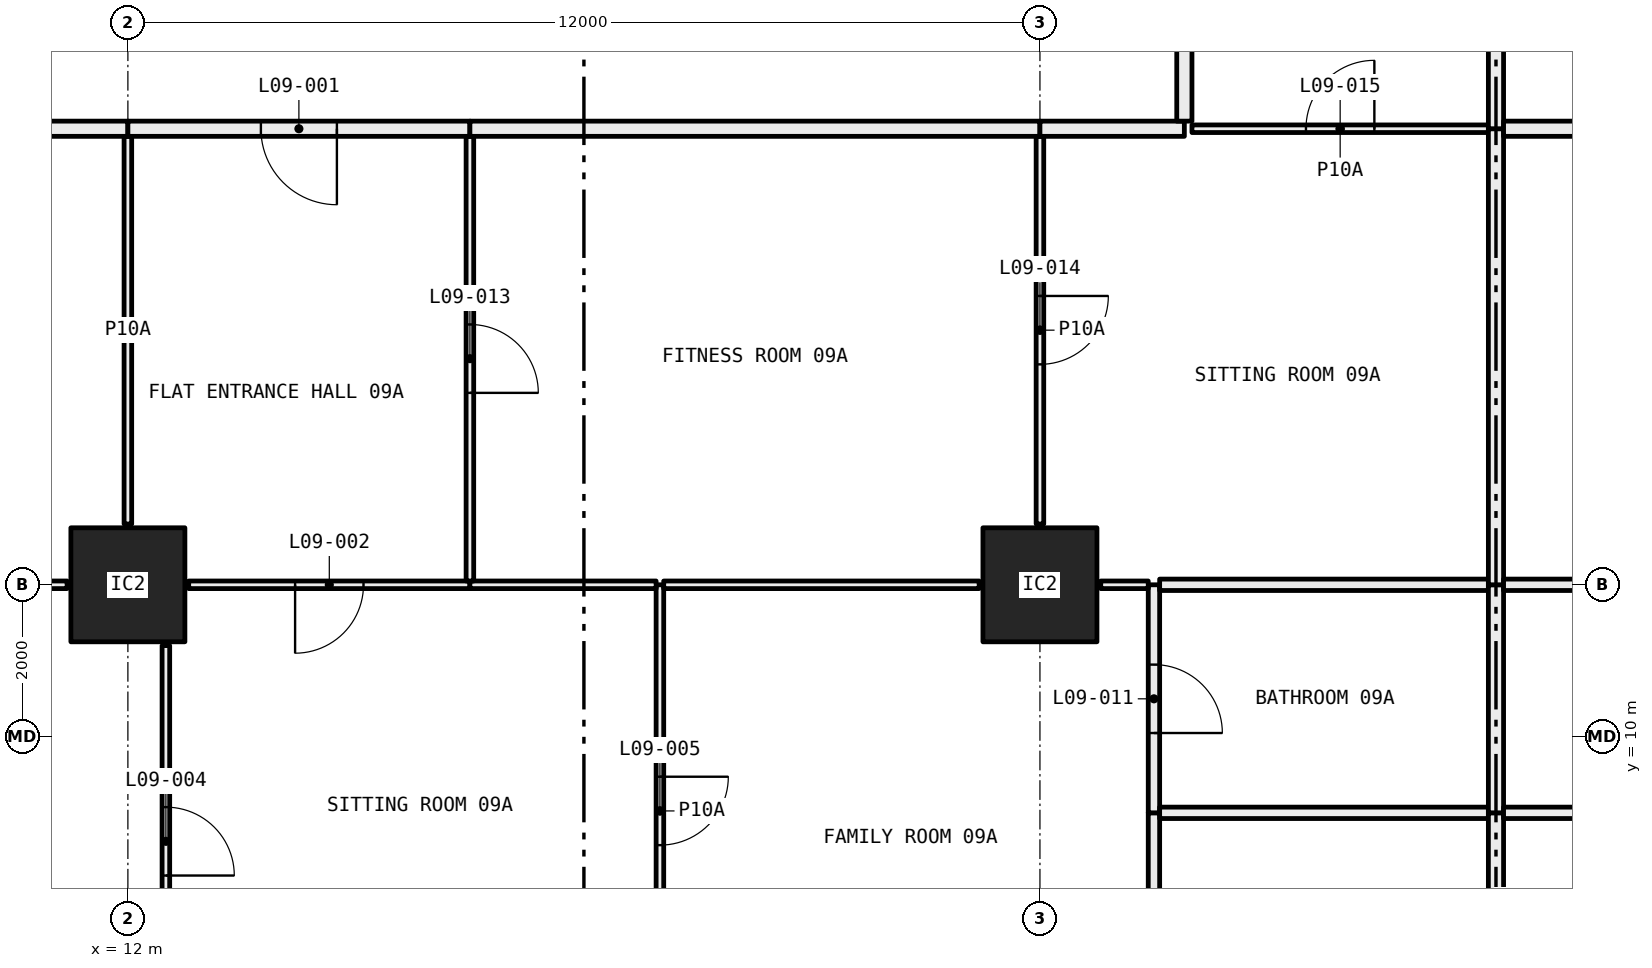
"""IFC4 building model, lengths in metres.
Left out: names, types, materials, properties, quantities, classifications, styles, units other than length and angle.
Written with IfcOpenShell. Run it as: python <this file> out.ifc"""

import sys

from ifc_helpers import new_model, si_unit, direction, frame, frame_2d, origin, origin_2d, place, context, subcontext, project, spatial, rectangle, hollow_rectangle, extrude, element, fill, save


model = new_model("IFC4")
c1 = context("Model", 3, precision=1e-05, world=origin(), true_north=direction((0.0, 1.0)))
c2 = subcontext(c1, "Body", "Model", "MODEL_VIEW")
j1 = project(units=[si_unit("LENGTHUNIT", "METRE"), si_unit("PLANEANGLEUNIT", "RADIAN")], contexts=[c1])
p1 = place(None, origin())
s1 = spatial("IfcSite", under=j1, at=p1, CompositionType="ELEMENT")
p2 = place(p1, origin())
s2 = spatial("IfcBuilding", under=s1, at=p2, CompositionType="ELEMENT")
p3 = place(p2, frame((0.0, 0.0, 43.8)))
s3 = spatial("IfcBuildingStorey", under=s2, at=p3, CompositionType="ELEMENT", Elevation=43.8)
for number, where, z_axis, x_axis in (
    (1, (12.0, 12.0, 0.0), (0.0, 0.0, 1.0), (1.0, 0.0, 0.0)),
    (2, (24.0, 12.0, 0.0), (0.0, 0.0, 1.0), (1.0, 0.0, 0.0)),
):
    element("IfcColumn", number, at=place(p3, frame(where, z_axis=z_axis, x_axis=x_axis)), inside=s3, PredefinedType="COLUMN", context=c2, shape_type="SweptSolid", body=[
        extrude(hollow_rectangle(XDim=1.5, YDim=1.5, WallThickness=0.065, at=origin_2d()), origin(), (0.0, 0.0, 1.0), 3.05),
    ])
p4 = place(p3, frame((12.5, 6.05, 0.0), z_axis=(0.0, 0.0, 1.0), x_axis=(0.0, 1.0, 0.0)))
e3 = element("IfcWall", 3, at=p4, inside=s3, PredefinedType="PARTITIONING", context=c2, shape_type="SweptSolid", body=[
    extrude(rectangle(XDim=5.15, YDim=0.1, at=frame_2d((2.575, 0.0))), origin(), (0.0, 0.0, 1.0), 3.05),
])
p5 = place(p4, frame((2.125, 0.0, 0.0)))
e4 = element("IfcOpeningElement", 4, at=p5, cuts=e3, PredefinedType="OPENING", context=c2, shape_type="SweptSolid", body=[
    extrude(rectangle(XDim=0.9, YDim=2.1, at=frame_2d((0.45, 1.05))), frame((0.0, 0.06, 0.0), z_axis=(0.0, -1.0, 0.0), x_axis=(1.0, 0.0, 0.0)), (0.0, 0.0, 1.0), 0.12),
])
p6 = place(p3, frame((11.2, 12.0, 0.0), z_axis=(0.0, 0.0, 1.0), x_axis=(-1.0, 0.0, 0.0)))
e5 = element("IfcWall", 5, at=p6, inside=s3, PredefinedType="PARTITIONING", context=c2, shape_type="SweptSolid", body=[
    extrude(rectangle(XDim=5.15, YDim=0.1, at=frame_2d((2.575, 0.0))), origin(), (0.0, 0.0, 1.0), 2.45),
])
p7 = place(p6, frame((2.125, 0.0, 0.0)))
e6 = element("IfcOpeningElement", 6, at=p7, cuts=e5, PredefinedType="OPENING", context=c2, shape_type="SweptSolid", body=[
    extrude(rectangle(XDim=0.9, YDim=2.1, at=frame_2d((0.45, 1.05))), frame((0.0, 0.06, 0.0), z_axis=(0.0, -1.0, 0.0), x_axis=(1.0, 0.0, 0.0)), (0.0, 0.0, 1.0), 0.12),
])
p8 = place(p3, frame((19.0, 6.05, 0.0), z_axis=(0.0, 0.0, 1.0), x_axis=(0.0, 1.0, 0.0)))
e7 = element("IfcWall", 7, at=p8, inside=s3, PredefinedType="PARTITIONING", context=c2, shape_type="SweptSolid", body=[
    extrude(rectangle(XDim=5.95, YDim=0.1, at=frame_2d((2.975, 0.0))), origin(), (0.0, 0.0, 1.0), 2.45),
])
p9 = place(p8, frame((2.525, 0.0, 0.0)))
e8 = element("IfcOpeningElement", 8, at=p9, cuts=e7, PredefinedType="OPENING", context=c2, shape_type="SweptSolid", body=[
    extrude(rectangle(XDim=0.9, YDim=2.1, at=frame_2d((0.45, 1.05))), frame((0.0, 0.06, 0.0), z_axis=(0.0, -1.0, 0.0), x_axis=(1.0, 0.0, 0.0)), (0.0, 0.0, 1.0), 0.12),
])
p10 = place(p3, frame((16.5, 12.0, 0.0), z_axis=(0.0, 0.0, 1.0), x_axis=(-1.0, 0.0, 0.0)))
e9 = element("IfcWall", 9, at=p10, inside=s3, PredefinedType="PARTITIONING", context=c2, shape_type="SweptSolid", body=[
    extrude(rectangle(XDim=3.7, YDim=0.1, at=frame_2d((1.85, 0.0))), origin(), (0.0, 0.0, 1.0), 2.45),
])
p11 = place(p10, frame((1.4, 0.0, 0.0)))
e10 = element("IfcOpeningElement", 10, at=p11, cuts=e9, PredefinedType="OPENING", context=c2, shape_type="SweptSolid", body=[
    extrude(rectangle(XDim=0.9, YDim=2.1, at=frame_2d((0.45, 1.05))), frame((0.0, 0.06, 0.0), z_axis=(0.0, -1.0, 0.0), x_axis=(1.0, 0.0, 0.0)), (0.0, 0.0, 1.0), 0.12),
])
p12 = place(p3, frame((18.95, 12.0, 0.0), z_axis=(0.0, 0.0, 1.0), x_axis=(-1.0, 0.0, 0.0)))
e11 = element("IfcWall", 11, at=p12, inside=s3, PredefinedType="PARTITIONING", context=c2, shape_type="SweptSolid", body=[
    extrude(rectangle(XDim=2.45, YDim=0.1, at=frame_2d((1.225, 0.0))), origin(), (0.0, 0.0, 1.0), 2.45),
])
p13 = place(p3, frame((25.5, 6.075, 0.0), z_axis=(0.0, 0.0, 1.0), x_axis=(0.0, 1.0, 0.0)))
e12 = element("IfcWall", 12, at=p13, inside=s3, PredefinedType="PARTITIONING", context=c2, shape_type="SweptSolid", body=[
    extrude(rectangle(XDim=2.925, YDim=0.15, at=frame_2d((1.462, 0.0))), origin(), (0.0, 0.0, 1.0), 3.05),
])
p14 = place(p13, frame((1.012, 0.0, 0.0)))
e13 = element("IfcOpeningElement", 13, at=p14, cuts=e12, PredefinedType="OPENING", context=c2, shape_type="SweptSolid", body=[
    extrude(rectangle(XDim=0.9, YDim=2.1, at=frame_2d((0.45, 1.05))), frame((0.0, 0.085, 0.0), z_axis=(0.0, -1.0, 0.0), x_axis=(1.0, 0.0, 0.0)), (0.0, 0.0, 1.0), 0.17),
])
p15 = place(p3, frame((25.5, 9.0, 0.0), z_axis=(0.0, 0.0, 1.0), x_axis=(0.0, 1.0, 0.0)))
e14 = element("IfcWall", 14, at=p15, inside=s3, PredefinedType="PARTITIONING", context=c2, shape_type="SweptSolid", body=[
    extrude(rectangle(XDim=3.0, YDim=0.15, at=frame_2d((1.5, 0.0))), origin(), (0.0, 0.0, 1.0), 2.45),
])
p16 = place(p15, frame((1.05, 0.0, 0.0)))
e15 = element("IfcOpeningElement", 15, at=p16, cuts=e14, PredefinedType="OPENING", context=c2, shape_type="SweptSolid", body=[
    extrude(rectangle(XDim=0.9, YDim=2.1, at=frame_2d((0.45, 1.05))), frame((0.0, 0.085, 0.0), z_axis=(0.0, -1.0, 0.0), x_axis=(1.0, 0.0, 0.0)), (0.0, 0.0, 1.0), 0.17),
])
p17 = place(p3, frame((23.2, 12.0, 0.0), z_axis=(0.0, 0.0, 1.0), x_axis=(-1.0, 0.0, 0.0)))
e16 = element("IfcWall", 16, at=p17, inside=s3, PredefinedType="PARTITIONING", context=c2, shape_type="SweptSolid", body=[
    extrude(rectangle(XDim=4.15, YDim=0.1, at=frame_2d((2.075, 0.0))), origin(), (0.0, 0.0, 1.0), 2.45),
])
p18 = place(p3, frame((25.425, 12.0, 0.0), z_axis=(0.0, 0.0, 1.0), x_axis=(-1.0, 0.0, 0.0)))
e17 = element("IfcWall", 17, at=p18, inside=s3, PredefinedType="PARTITIONING", context=c2, shape_type="SweptSolid", body=[
    extrude(rectangle(XDim=0.625, YDim=0.1, at=frame_2d((0.312, 0.0))), origin(), (0.0, 0.0, 1.0), 2.45),
])
p19 = place(p3, frame((29.9, 9.0, 0.0), z_axis=(0.0, 0.0, 1.0), x_axis=(-1.0, 0.0, 0.0)))
e18 = element("IfcWall", 18, at=p19, inside=s3, PredefinedType="PARTITIONING", context=c2, shape_type="SweptSolid", body=[
    extrude(rectangle(XDim=4.325, YDim=0.15, at=frame_2d((2.163, 0.0))), origin(), (0.0, 0.0, 1.0), 3.05),
])
p20 = place(p3, frame((30.0, 6.0, 0.0), z_axis=(0.0, 0.0, 1.0), x_axis=(0.0, 1.0, 0.0)))
e19 = element("IfcWall", 19, at=p20, inside=s3, PredefinedType="PARTITIONING", context=c2, shape_type="SweptSolid", body=[
    extrude(rectangle(XDim=3.0, YDim=0.2, at=frame_2d((1.5, 0.0))), origin(), (0.0, 0.0, 1.0), 3.05),
])
p21 = place(p3, frame((29.9, 12.0, 0.0), z_axis=(0.0, 0.0, 1.0), x_axis=(-1.0, 0.0, 0.0)))
e20 = element("IfcWall", 20, at=p21, inside=s3, PredefinedType="PARTITIONING", context=c2, shape_type="SweptSolid", body=[
    extrude(rectangle(XDim=4.325, YDim=0.15, at=frame_2d((2.163, 0.0))), origin(), (0.0, 0.0, 1.0), 2.45),
])
p22 = place(p3, frame((30.0, 9.0, 0.0), z_axis=(0.0, 0.0, 1.0), x_axis=(0.0, 1.0, 0.0)))
e21 = element("IfcWall", 21, at=p22, inside=s3, PredefinedType="PARTITIONING", context=c2, shape_type="SweptSolid", body=[
    extrude(rectangle(XDim=3.0, YDim=0.2, at=frame_2d((1.5, 0.0))), origin(), (0.0, 0.0, 1.0), 2.45),
])
p23 = place(p3, frame((12.0, 12.8, 0.0), z_axis=(0.0, 0.0, 1.0), x_axis=(0.0, 1.0, 0.0)))
e22 = element("IfcWall", 22, at=p23, inside=s3, PredefinedType="PARTITIONING", context=c2, shape_type="SweptSolid", body=[
    extrude(rectangle(XDim=5.1, YDim=0.1, at=frame_2d((2.55, 0.0))), origin(), (0.0, 0.0, 1.0), 3.05),
])
p24 = place(p3, frame((12.0, 18.0, 0.0), z_axis=(0.0, 0.0, 1.0), x_axis=(-1.0, 0.0, 0.0)))
e23 = element("IfcWall", 23, at=p24, inside=s3, PredefinedType="PARTITIONING", context=c2, shape_type="SweptSolid", body=[
    extrude(rectangle(XDim=1.9, YDim=0.2, at=frame_2d((0.95, 0.0))), origin(), (0.0, 0.0, 1.0), 3.05),
])
p25 = place(p3, frame((16.5, 12.05, 0.0), z_axis=(0.0, 0.0, 1.0), x_axis=(0.0, 1.0, 0.0)))
e24 = element("IfcWall", 24, at=p25, inside=s3, PredefinedType="PARTITIONING", context=c2, shape_type="SweptSolid", body=[
    extrude(rectangle(XDim=5.85, YDim=0.1, at=frame_2d((2.925, 0.0))), origin(), (0.0, 0.0, 1.0), 2.45),
])
p26 = place(p25, frame((2.475, 0.0, 0.0)))
e25 = element("IfcOpeningElement", 25, at=p26, cuts=e24, PredefinedType="OPENING", context=c2, shape_type="SweptSolid", body=[
    extrude(rectangle(XDim=0.9, YDim=2.1, at=frame_2d((0.45, 1.05))), frame((0.0, 0.06, 0.0), z_axis=(0.0, -1.0, 0.0), x_axis=(1.0, 0.0, 0.0)), (0.0, 0.0, 1.0), 0.12),
])
p27 = place(p3, frame((16.5, 18.0, 0.0), z_axis=(0.0, 0.0, 1.0), x_axis=(-1.0, 0.0, 0.0)))
e26 = element("IfcWall", 26, at=p27, inside=s3, PredefinedType="PARTITIONING", context=c2, shape_type="SweptSolid", body=[
    extrude(rectangle(XDim=4.5, YDim=0.2, at=frame_2d((2.25, 0.0))), origin(), (0.0, 0.0, 1.0), 3.05),
])
p28 = place(p27, frame((1.75, 0.0, 0.0)))
e27 = element("IfcOpeningElement", 27, at=p28, cuts=e26, PredefinedType="OPENING", context=c2, shape_type="SweptSolid", body=[
    extrude(rectangle(XDim=1.0, YDim=2.1, at=frame_2d((0.5, 1.05))), frame((0.0, 0.11, 0.0), z_axis=(0.0, -1.0, 0.0), x_axis=(1.0, 0.0, 0.0)), (0.0, 0.0, 1.0), 0.22),
])
p29 = place(p3, frame((24.0, 12.8, 0.0), z_axis=(0.0, 0.0, 1.0), x_axis=(0.0, 1.0, 0.0)))
e28 = element("IfcWall", 28, at=p29, inside=s3, PredefinedType="PARTITIONING", context=c2, shape_type="SweptSolid", body=[
    extrude(rectangle(XDim=5.1, YDim=0.1, at=frame_2d((2.55, 0.0))), origin(), (0.0, 0.0, 1.0), 3.05),
])
p30 = place(p29, frame((2.1, 0.0, 0.0)))
e29 = element("IfcOpeningElement", 29, at=p30, cuts=e28, PredefinedType="OPENING", context=c2, shape_type="SweptSolid", body=[
    extrude(rectangle(XDim=0.9, YDim=2.1, at=frame_2d((0.45, 1.05))), frame((0.0, 0.06, 0.0), z_axis=(0.0, -1.0, 0.0), x_axis=(1.0, 0.0, 0.0)), (0.0, 0.0, 1.0), 0.12),
])
p31 = place(p3, frame((24.0, 18.0, 0.0), z_axis=(0.0, 0.0, 1.0), x_axis=(-1.0, 0.0, 0.0)))
e30 = element("IfcWall", 30, at=p31, inside=s3, PredefinedType="PARTITIONING", context=c2, shape_type="SweptSolid", body=[
    extrude(rectangle(XDim=7.5, YDim=0.2, at=frame_2d((3.75, 0.0))), origin(), (0.0, 0.0, 1.0), 3.05),
])
p32 = place(p3, frame((29.9, 18.0, 0.0), z_axis=(0.0, 0.0, 1.0), x_axis=(-1.0, 0.0, 0.0)))
e31 = element("IfcWall", 31, at=p32, inside=s3, PredefinedType="PARTITIONING", context=c2, shape_type="SweptSolid", body=[
    extrude(rectangle(XDim=3.9, YDim=0.1, at=frame_2d((1.95, 0.0))), origin(), (0.0, 0.0, 1.0), 3.05),
])
p33 = place(p32, frame((1.5, 0.0, 0.0)))
e32 = element("IfcOpeningElement", 32, at=p33, cuts=e31, PredefinedType="OPENING", context=c2, shape_type="SweptSolid", body=[
    extrude(rectangle(XDim=0.9, YDim=2.1, at=frame_2d((0.45, 1.05))), frame((0.0, 0.06, 0.0), z_axis=(0.0, -1.0, 0.0), x_axis=(1.0, 0.0, 0.0)), (0.0, 0.0, 1.0), 0.12),
])
p34 = place(p3, frame((30.0, 12.0, 0.0), z_axis=(0.0, 0.0, 1.0), x_axis=(0.0, 1.0, 0.0)))
e33 = element("IfcWall", 33, at=p34, inside=s3, PredefinedType="PARTITIONING", context=c2, shape_type="SweptSolid", body=[
    extrude(rectangle(XDim=6.0, YDim=0.2, at=frame_2d((3.0, 0.0))), origin(), (0.0, 0.0, 1.0), 2.45),
])
p35 = place(p3, frame((25.9, 18.0, 0.0), z_axis=(0.0, 0.0, 1.0), x_axis=(-1.0, 0.0, 0.0)))
e34 = element("IfcWall", 34, at=p35, inside=s3, PredefinedType="PARTITIONING", context=c2, shape_type="SweptSolid", body=[
    extrude(rectangle(XDim=1.9, YDim=0.2, at=frame_2d((0.95, 0.0))), origin(), (0.0, 0.0, 1.0), 3.05),
])
p36 = place(p3, frame((30.0, 18.0, 0.0), z_axis=(0.0, 0.0, 1.0), x_axis=(0.0, 1.0, 0.0)))
e35 = element("IfcWall", 35, at=p36, inside=s3, PredefinedType="PARTITIONING", context=c2, shape_type="SweptSolid", body=[
    extrude(rectangle(XDim=6.3, YDim=0.2, at=frame_2d((3.15, 0.0))), origin(), (0.0, 0.0, 1.0), 2.45),
])
p37 = place(p3, frame((25.9, 23.9, 0.0), z_axis=(0.0, 0.0, 1.0), x_axis=(0.0, -1.0, 0.0)))
e36 = element("IfcWall", 36, at=p37, inside=s3, PredefinedType="PARTITIONING", context=c2, shape_type="SweptSolid", body=[
    extrude(rectangle(XDim=5.8, YDim=0.2, at=frame_2d((2.9, 0.0))), origin(), (0.0, 0.0, 1.0), 3.05),
])
p38 = place(p3, frame((34.5, 9.0, 0.0), z_axis=(0.0, 0.0, 1.0), x_axis=(-1.0, 0.0, 0.0)))
e37 = element("IfcWall", 37, at=p38, inside=s3, PredefinedType="PARTITIONING", context=c2, shape_type="SweptSolid", body=[
    extrude(rectangle(XDim=4.4, YDim=0.15, at=frame_2d((2.2, 0.0))), origin(), (0.0, 0.0, 1.0), 3.05),
])
p39 = place(p3, frame((34.425, 12.0, 0.0), z_axis=(0.0, 0.0, 1.0), x_axis=(-1.0, 0.0, 0.0)))
e38 = element("IfcWall", 38, at=p39, inside=s3, PredefinedType="PARTITIONING", context=c2, shape_type="SweptSolid", body=[
    extrude(rectangle(XDim=4.325, YDim=0.15, at=frame_2d((2.163, 0.0))), origin(), (0.0, 0.0, 1.0), 2.45),
])
p40 = place(p3, frame((36.0, 18.0, 0.0), z_axis=(0.0, 0.0, 1.0), x_axis=(-1.0, 0.0, 0.0)))
e39 = element("IfcWall", 39, at=p40, inside=s3, PredefinedType="PARTITIONING", context=c2, shape_type="SweptSolid", body=[
    extrude(rectangle(XDim=5.9, YDim=0.2, at=frame_2d((2.95, 0.0))), origin(), (0.0, 0.0, 1.0), 2.45),
])
p41 = place(p28, origin())
e40 = element("IfcDoor", 40, at=p41, inside=s3, OperationType="SINGLE_SWING_RIGHT", PredefinedType="DOOR", context=c2, shape_type="SweptSolid", body=[
    extrude(rectangle(XDim=1.0, YDim=2.1, at=frame_2d((0.5, 1.05))), frame((0.0, 0.025, 0.0), z_axis=(0.0, -1.0, 0.0), x_axis=(1.0, 0.0, 0.0)), (0.0, 0.0, 1.0), 0.05),
])
fill(e27, e40)
p42 = place(p11, origin())
e41 = element("IfcDoor", 41, at=p42, inside=s3, OperationType="SINGLE_SWING_LEFT", PredefinedType="DOOR", context=c2, shape_type="SweptSolid", body=[
    extrude(rectangle(XDim=0.9, YDim=2.1, at=frame_2d((0.45, 1.05))), frame((0.0, 0.025, 0.0), z_axis=(0.0, -1.0, 0.0), x_axis=(1.0, 0.0, 0.0)), (0.0, 0.0, 1.0), 0.05),
])
fill(e10, e41)
p43 = place(p5, frame((0.9, 0.0, 0.0), x_axis=(-1.0, 0.0, 0.0)))
e42 = element("IfcDoor", 42, at=p43, inside=s3, OperationType="SINGLE_SWING_LEFT", PredefinedType="DOOR", context=c2, shape_type="SweptSolid", body=[
    extrude(rectangle(XDim=0.9, YDim=2.1, at=frame_2d((0.45, 1.05))), frame((0.0, 0.025, 0.0), z_axis=(0.0, -1.0, 0.0), x_axis=(1.0, 0.0, 0.0)), (0.0, 0.0, 1.0), 0.05),
])
fill(e4, e42)
p44 = place(p9, frame((0.9, 0.0, 0.0), x_axis=(-1.0, 0.0, 0.0)))
e43 = element("IfcDoor", 43, at=p44, inside=s3, OperationType="SINGLE_SWING_RIGHT", PredefinedType="DOOR", context=c2, shape_type="SweptSolid", body=[
    extrude(rectangle(XDim=0.9, YDim=2.1, at=frame_2d((0.45, 1.05))), frame((0.0, 0.025, 0.0), z_axis=(0.0, -1.0, 0.0), x_axis=(1.0, 0.0, 0.0)), (0.0, 0.0, 1.0), 0.05),
])
fill(e8, e43)
p45 = place(p16, frame((0.9, 0.0, 0.0), x_axis=(-1.0, 0.0, 0.0)))
e44 = element("IfcDoor", 44, at=p45, inside=s3, OperationType="SINGLE_SWING_LEFT", PredefinedType="DOOR", context=c2, shape_type="SweptSolid", body=[
    extrude(rectangle(XDim=0.9, YDim=2.1, at=frame_2d((0.45, 1.05))), frame((0.0, 0.025, 0.0), z_axis=(0.0, -1.0, 0.0), x_axis=(1.0, 0.0, 0.0)), (0.0, 0.0, 1.0), 0.05),
])
fill(e15, e44)
p46 = place(p26, frame((0.9, 0.0, 0.0), x_axis=(-1.0, 0.0, 0.0)))
e45 = element("IfcDoor", 45, at=p46, inside=s3, OperationType="SINGLE_SWING_LEFT", PredefinedType="DOOR", context=c2, shape_type="SweptSolid", body=[
    extrude(rectangle(XDim=0.9, YDim=2.1, at=frame_2d((0.45, 1.05))), frame((0.0, 0.025, 0.0), z_axis=(0.0, -1.0, 0.0), x_axis=(1.0, 0.0, 0.0)), (0.0, 0.0, 1.0), 0.05),
])
fill(e25, e45)
p47 = place(p30, frame((0.9, 0.0, 0.0), x_axis=(-1.0, 0.0, 0.0)))
e46 = element("IfcDoor", 46, at=p47, inside=s3, OperationType="SINGLE_SWING_RIGHT", PredefinedType="DOOR", context=c2, shape_type="SweptSolid", body=[
    extrude(rectangle(XDim=0.9, YDim=2.1, at=frame_2d((0.45, 1.05))), frame((0.0, 0.025, 0.0), z_axis=(0.0, -1.0, 0.0), x_axis=(1.0, 0.0, 0.0)), (0.0, 0.0, 1.0), 0.05),
])
fill(e29, e46)
p48 = place(p33, frame((0.9, 0.0, 0.0), x_axis=(-1.0, 0.0, 0.0)))
e47 = element("IfcDoor", 47, at=p48, inside=s3, OperationType="SINGLE_SWING_LEFT", PredefinedType="DOOR", context=c2, shape_type="SweptSolid", body=[
    extrude(rectangle(XDim=0.9, YDim=2.1, at=frame_2d((0.45, 1.05))), frame((0.0, 0.025, 0.0), z_axis=(0.0, -1.0, 0.0), x_axis=(1.0, 0.0, 0.0)), (0.0, 0.0, 1.0), 0.05),
])
fill(e32, e47)
save(model, sys.argv[1])
